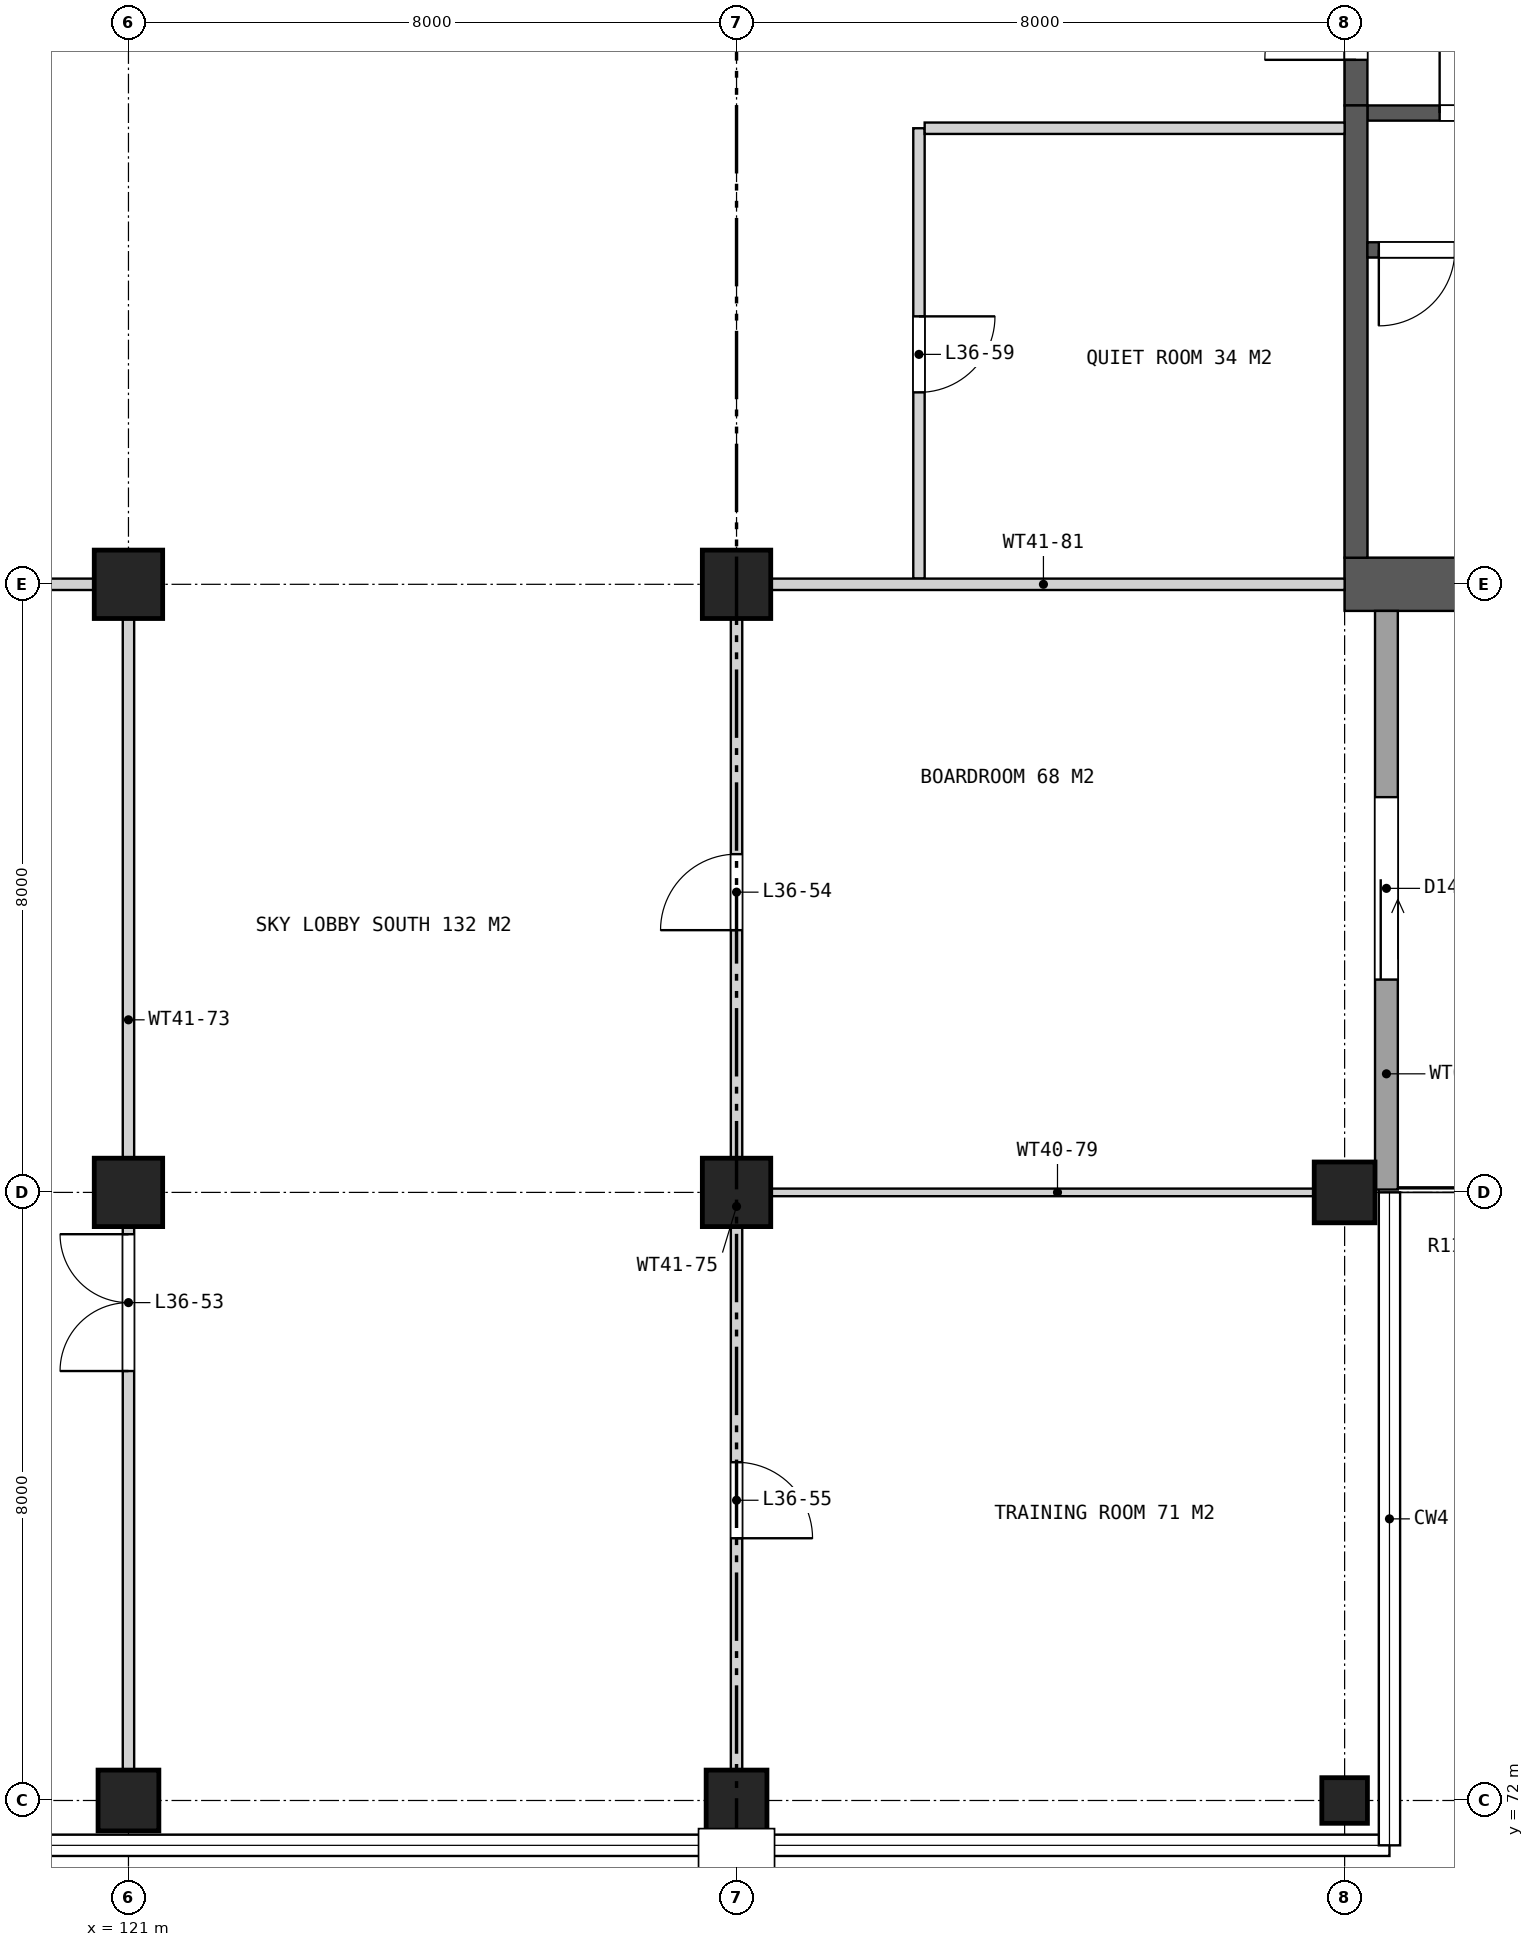
"""IFC4 building model, lengths in metres.
Left out: names, types, materials, properties, quantities, classifications, styles, units other than length and angle.
Written with IfcOpenShell. Run it as: python <this file> out.ifc"""

import sys

from ifc_helpers import new_model, si_unit, direction, frame, frame_2d, origin, origin_2d, place, context, subcontext, project, spatial, rectangle, extrude, element, fill, save


model = new_model("IFC4")
c1 = context("Model", 3, precision=1e-05, world=origin(), true_north=direction((0.0, 1.0)))
c2 = subcontext(c1, "Body", "Model", "MODEL_VIEW")
j1 = project(units=[si_unit("LENGTHUNIT", "METRE"), si_unit("PLANEANGLEUNIT", "RADIAN")], contexts=[c1])
p1 = place(None, origin())
s1 = spatial("IfcSite", under=j1, at=p1, CompositionType="ELEMENT")
p2 = place(p1, origin())
s2 = spatial("IfcBuilding", under=s1, at=p2, CompositionType="ELEMENT")
p3 = place(p2, frame((0.0, 0.0, 171.5)))
s3 = spatial("IfcBuildingStorey", under=s2, at=p3, CompositionType="ELEMENT", Elevation=171.5)
p4 = place(p3, frame((121.0, 72.0, 0.0), z_axis=(0.0, 0.0, 1.0), x_axis=(1.0, 0.0, 0.0)))
e1 = element("IfcColumn", 1, at=p4, inside=s3, PredefinedType="COLUMN", context=c2, shape_type="SweptSolid", body=[
    extrude(rectangle(XDim=0.8, YDim=0.8, at=origin_2d()), origin(), (0.0, 0.0, 1.0), 7.4),
])
for number, where, z_axis, x_axis in (
    (2, (121.0, 80.0, 0.0), (0.0, 0.0, 1.0), (1.0, 0.0, 0.0)),
    (3, (121.0, 88.0, 0.0), (0.0, 0.0, 1.0), (1.0, 0.0, 0.0)),
):
    element("IfcColumn", number, at=place(p3, frame(where, z_axis=z_axis, x_axis=x_axis)), inside=s3, PredefinedType="COLUMN", context=c2, shape_type="SweptSolid", body=[
        extrude(rectangle(XDim=0.9, YDim=0.9, at=origin_2d()), origin(), (0.0, 0.0, 1.0), 7.4),
    ])
p5 = place(p3, frame((129.0, 72.0, 0.0), z_axis=(0.0, 0.0, 1.0), x_axis=(1.0, 0.0, 0.0)))
e4 = element("IfcColumn", 4, at=p5, inside=s3, PredefinedType="COLUMN", context=c2, shape_type="SweptSolid", body=[
    extrude(rectangle(XDim=0.8, YDim=0.8, at=origin_2d()), origin(), (0.0, 0.0, 1.0), 7.4),
])
for number, where, z_axis, x_axis in (
    (5, (129.0, 80.0, 0.0), (0.0, 0.0, 1.0), (1.0, 0.0, 0.0)),
    (6, (129.0, 88.0, 0.0), (0.0, 0.0, 1.0), (1.0, 0.0, 0.0)),
):
    element("IfcColumn", number, at=place(p3, frame(where, z_axis=z_axis, x_axis=x_axis)), inside=s3, PredefinedType="COLUMN", context=c2, shape_type="SweptSolid", body=[
        extrude(rectangle(XDim=0.9, YDim=0.9, at=origin_2d()), origin(), (0.0, 0.0, 1.0), 7.4),
    ])
p6 = place(p3, frame((137.0, 72.0, 0.0), z_axis=(0.0, 0.0, 1.0), x_axis=(1.0, 0.0, 0.0)))
e7 = element("IfcColumn", 7, at=p6, inside=s3, PredefinedType="COLUMN", context=c2, shape_type="SweptSolid", body=[
    extrude(rectangle(XDim=0.6, YDim=0.6, at=origin_2d()), origin(), (0.0, 0.0, 1.0), 7.4),
])
p7 = place(p3, frame((137.0, 80.0, 0.0), z_axis=(0.0, 0.0, 1.0), x_axis=(1.0, 0.0, 0.0)))
e8 = element("IfcColumn", 8, at=p7, inside=s3, PredefinedType="COLUMN", context=c2, shape_type="SweptSolid", body=[
    extrude(rectangle(XDim=0.8, YDim=0.8, at=origin_2d()), origin(), (0.0, 0.0, 1.0), 7.4),
])
p8 = place(p3, frame((137.0, 88.0, 0.0), z_axis=(0.0, 0.0, 1.0), x_axis=(1.0, 0.0, 0.0)))
e9 = element("IfcWall", 9, at=p8, inside=s3, PredefinedType="SHEAR", context=c2, shape_type="SweptSolid", body=[
    extrude(rectangle(XDim=7.1, YDim=0.7, at=frame_2d((3.55, 0.0))), origin(), (0.0, 0.0, 1.0), 7.4),
])
p9 = place(p3, frame((137.15, 94.3, 0.0), z_axis=(0.0, 0.0, 1.0), x_axis=(0.0, 1.0, 0.0)))
e10 = element("IfcWall", 10, at=p9, inside=s3, PredefinedType="SHEAR", context=c2, shape_type="SweptSolid", body=[
    extrude(rectangle(XDim=11.4, YDim=0.3, at=frame_2d((5.7, 0.0))), origin(), (0.0, 0.0, 1.0), 7.4),
])
p10 = place(p9, frame((0.6, 0.0, 0.0)))
e11 = element("IfcOpeningElement", 11, at=p10, cuts=e10, PredefinedType="OPENING", context=c2, shape_type="SweptSolid", body=[
    extrude(rectangle(XDim=2.4, YDim=2.4, at=frame_2d((1.2, 1.2))), frame((0.0, 0.16, 0.0), z_axis=(0.0, -1.0, 0.0), x_axis=(1.0, 0.0, 0.0)), (0.0, 0.0, 1.0), 0.32),
])
p11 = place(p9, frame((4.5, 0.0, 0.0)))
e12 = element("IfcOpeningElement", 12, at=p11, cuts=e10, PredefinedType="OPENING", context=c2, shape_type="SweptSolid", body=[
    extrude(rectangle(XDim=2.4, YDim=2.4, at=frame_2d((1.2, 1.2))), frame((0.0, 0.16, 0.0), z_axis=(0.0, -1.0, 0.0), x_axis=(1.0, 0.0, 0.0)), (0.0, 0.0, 1.0), 0.32),
])
p12 = place(p9, frame((8.4, 0.0, 0.0)))
e13 = element("IfcOpeningElement", 13, at=p12, cuts=e10, PredefinedType="OPENING", context=c2, shape_type="SweptSolid", body=[
    extrude(rectangle(XDim=2.4, YDim=2.4, at=frame_2d((1.2, 1.2))), frame((0.0, 0.16, 0.0), z_axis=(0.0, -1.0, 0.0), x_axis=(1.0, 0.0, 0.0)), (0.0, 0.0, 1.0), 0.32),
])
p13 = place(p3, frame((137.3, 94.2, 0.0), z_axis=(0.0, 0.0, 1.0), x_axis=(1.0, 0.0, 0.0)))
e14 = element("IfcWall", 14, at=p13, inside=s3, PredefinedType="SHEAR", context=c2, shape_type="SweptSolid", body=[
    extrude(rectangle(XDim=15.35, YDim=0.2, at=frame_2d((7.675, 0.0))), origin(), (0.0, 0.0, 1.0), 7.4),
])
p14 = place(p13, frame((0.95, 0.0, 0.0)))
e15 = element("IfcOpeningElement", 15, at=p14, cuts=e14, PredefinedType="OPENING", context=c2, shape_type="SweptSolid", body=[
    extrude(rectangle(XDim=1.1, YDim=2.1, at=frame_2d((0.55, 1.05))), frame((0.0, 0.11, 0.0), z_axis=(0.0, -1.0, 0.0), x_axis=(1.0, 0.0, 0.0)), (0.0, 0.0, 1.0), 0.22),
])
p15 = place(p3, frame((137.15, 88.35, 0.0), z_axis=(0.0, 0.0, 1.0), x_axis=(0.0, 1.0, 0.0)))
e16 = element("IfcWall", 16, at=p15, inside=s3, PredefinedType="SHEAR", context=c2, shape_type="SweptSolid", body=[
    extrude(rectangle(XDim=5.95, YDim=0.3, at=frame_2d((2.975, 0.0))), origin(), (0.0, 0.0, 1.0), 7.4),
])
p16 = place(p3, frame((137.3, 92.4, 0.0), z_axis=(0.0, 0.0, 1.0), x_axis=(1.0, 0.0, 0.0)))
e17 = element("IfcWall", 17, at=p16, inside=s3, PredefinedType="SHEAR", context=c2, shape_type="SweptSolid", body=[
    extrude(rectangle(XDim=6.8, YDim=0.2, at=frame_2d((3.4, 0.0))), origin(), (0.0, 0.0, 1.0), 7.4),
])
p17 = place(p16, frame((0.15, 0.0, 0.0)))
e18 = element("IfcOpeningElement", 18, at=p17, cuts=e17, PredefinedType="OPENING", context=c2, shape_type="SweptSolid", body=[
    extrude(rectangle(XDim=1.0, YDim=2.1, at=frame_2d((0.5, 1.05))), frame((0.0, 0.11, 0.0), z_axis=(0.0, -1.0, 0.0), x_axis=(1.0, 0.0, 0.0)), (0.0, 0.0, 1.0), 0.22),
])
p18 = place(p3, frame((137.55, 80.038, 0.0), z_axis=(0.0, 0.0, 1.0), x_axis=(0.0, 1.0, 0.0)))
e19 = element("IfcWall", 19, at=p18, inside=s3, PredefinedType="SOLIDWALL", context=c2, shape_type="SweptSolid", body=[
    extrude(rectangle(XDim=7.612, YDim=0.3, at=frame_2d((3.806, 0.0))), origin(), (0.0, 0.0, 1.0), 7.1),
])
p19 = place(p18, frame((2.762, 0.0, 0.0)))
e20 = element("IfcOpeningElement", 20, at=p19, cuts=e19, PredefinedType="OPENING", context=c2, shape_type="SweptSolid", body=[
    extrude(rectangle(XDim=2.4, YDim=2.4, at=frame_2d((1.2, 1.2))), frame((0.0, 0.16, 0.0), z_axis=(0.0, -1.0, 0.0), x_axis=(1.0, 0.0, 0.0)), (0.0, 0.0, 1.0), 0.32),
])
p20 = place(p3, frame((121.0, 71.63, 0.0), z_axis=(0.0, 0.0, 1.0), x_axis=(0.0, 1.0, 0.0)))
e21 = element("IfcWall", 21, at=p20, inside=s3, PredefinedType="PARTITIONING", context=c2, shape_type="SweptSolid", body=[
    extrude(rectangle(XDim=16.37, YDim=0.15, at=frame_2d((8.185, 0.0))), origin(), (0.0, 0.0, 1.0), 6.64),
])
p21 = place(p20, frame((6.02, 0.0, 0.0)))
e22 = element("IfcOpeningElement", 22, at=p21, cuts=e21, PredefinedType="OPENING", context=c2, shape_type="SweptSolid", body=[
    extrude(rectangle(XDim=1.8, YDim=2.1, at=frame_2d((0.9, 1.05))), frame((0.0, 0.085, 0.0), z_axis=(0.0, -1.0, 0.0), x_axis=(1.0, 0.0, 0.0)), (0.0, 0.0, 1.0), 0.17),
])
p22 = place(p3, frame((129.0, 71.63, 0.0), z_axis=(0.0, 0.0, 1.0), x_axis=(0.0, 1.0, 0.0)))
e23 = element("IfcWall", 23, at=p22, inside=s3, PredefinedType="PARTITIONING", context=c2, shape_type="SweptSolid", body=[
    extrude(rectangle(XDim=16.37, YDim=0.15, at=frame_2d((8.185, 0.0))), origin(), (0.0, 0.0, 1.0), 6.64),
])
p23 = place(p22, frame((11.82, 0.0, 0.0)))
e24 = element("IfcOpeningElement", 24, at=p23, cuts=e23, PredefinedType="OPENING", context=c2, shape_type="SweptSolid", body=[
    extrude(rectangle(XDim=1.0, YDim=2.1, at=frame_2d((0.5, 1.05))), frame((0.0, 0.085, 0.0), z_axis=(0.0, -1.0, 0.0), x_axis=(1.0, 0.0, 0.0)), (0.0, 0.0, 1.0), 0.17),
])
p24 = place(p22, frame((3.82, 0.0, 0.0)))
e25 = element("IfcOpeningElement", 25, at=p24, cuts=e23, PredefinedType="OPENING", context=c2, shape_type="SweptSolid", body=[
    extrude(rectangle(XDim=1.0, YDim=2.1, at=frame_2d((0.5, 1.05))), frame((0.0, 0.085, 0.0), z_axis=(0.0, -1.0, 0.0), x_axis=(1.0, 0.0, 0.0)), (0.0, 0.0, 1.0), 0.17),
])
p25 = place(p3, frame((131.4, 88.075, 0.0), z_axis=(0.0, 0.0, 1.0), x_axis=(0.0, 1.0, 0.0)))
e26 = element("IfcWall", 26, at=p25, inside=s3, PredefinedType="PARTITIONING", context=c2, shape_type="SweptSolid", body=[
    extrude(rectangle(XDim=5.925, YDim=0.15, at=frame_2d((2.962, 0.0))), origin(), (0.0, 0.0, 1.0), 6.64),
])
p26 = place(p25, frame((2.45, 0.0, 0.0)))
e27 = element("IfcOpeningElement", 27, at=p26, cuts=e26, PredefinedType="OPENING", context=c2, shape_type="SweptSolid", body=[
    extrude(rectangle(XDim=1.0, YDim=2.1, at=frame_2d((0.5, 1.05))), frame((0.0, 0.085, 0.0), z_axis=(0.0, -1.0, 0.0), x_axis=(1.0, 0.0, 0.0)), (0.0, 0.0, 1.0), 0.17),
])
p27 = place(p3, frame((129.075, 80.0, 0.0), z_axis=(0.0, 0.0, 1.0), x_axis=(1.0, 0.0, 0.0)))
e28 = element("IfcWall", 28, at=p27, inside=s3, PredefinedType="PARTITIONING", context=c2, shape_type="SweptSolid", body=[
    extrude(rectangle(XDim=8.295, YDim=0.1, at=frame_2d((4.147, 0.0))), origin(), (0.0, 0.0, 1.0), 6.64),
])
for number, where, z_axis, x_axis in (
    (29, (113.0, 88.0, 0.0), (0.0, 0.0, 1.0), (1.0, 0.0, 0.0)),
    (30, (129.075, 88.0, 0.0), (0.0, 0.0, 1.0), (1.0, 0.0, 0.0)),
):
    element("IfcWall", number, at=place(p3, frame(where, z_axis=z_axis, x_axis=x_axis)), inside=s3, PredefinedType="PARTITIONING", context=c2, shape_type="SweptSolid", body=[
        extrude(rectangle(XDim=7.925, YDim=0.15, at=frame_2d((3.962, 0.0))), origin(), (0.0, 0.0, 1.0), 6.64),
    ])
p28 = place(p3, frame((131.475, 94.0, 0.0), z_axis=(0.0, 0.0, 1.0), x_axis=(1.0, 0.0, 0.0)))
e31 = element("IfcWall", 31, at=p28, inside=s3, PredefinedType="PARTITIONING", context=c2, shape_type="SweptSolid", body=[
    extrude(rectangle(XDim=5.525, YDim=0.15, at=frame_2d((2.762, 0.0))), origin(), (0.0, 0.0, 1.0), 6.64),
])
p29 = place(p10, origin())
e32 = element("IfcDoor", 32, at=p29, inside=s3, OperationType="DOUBLE_DOOR_SINGLE_SWING", PredefinedType="DOOR", context=c2, shape_type="SweptSolid", body=[
    extrude(rectangle(XDim=2.4, YDim=2.4, at=frame_2d((1.2, 1.2))), frame((0.0, 0.025, 0.0), z_axis=(0.0, -1.0, 0.0), x_axis=(1.0, 0.0, 0.0)), (0.0, 0.0, 1.0), 0.05),
])
fill(e11, e32)
p30 = place(p14, origin())
e33 = element("IfcDoor", 33, at=p30, inside=s3, OperationType="SINGLE_SWING_LEFT", PredefinedType="DOOR", context=c2, shape_type="SweptSolid", body=[
    extrude(rectangle(XDim=1.1, YDim=2.1, at=frame_2d((0.55, 1.05))), frame((0.0, 0.025, 0.0), z_axis=(0.0, -1.0, 0.0), x_axis=(1.0, 0.0, 0.0)), (0.0, 0.0, 1.0), 0.05),
])
fill(e15, e33)
p31 = place(p17, frame((1.0, 0.0, 0.0), z_axis=(0.0, 0.0, 1.0), x_axis=(-1.0, 0.0, 0.0)))
e34 = element("IfcDoor", 34, at=p31, inside=s3, OperationType="SINGLE_SWING_RIGHT", PredefinedType="DOOR", context=c2, shape_type="SweptSolid", body=[
    extrude(rectangle(XDim=1.0, YDim=2.1, at=frame_2d((0.5, 1.05))), frame((0.0, 0.025, 0.0), z_axis=(0.0, -1.0, 0.0), x_axis=(1.0, 0.0, 0.0)), (0.0, 0.0, 1.0), 0.05),
])
fill(e18, e34)
p32 = place(p19, frame((2.4, 0.0, 0.0), z_axis=(0.0, 0.0, 1.0), x_axis=(-1.0, 0.0, 0.0)))
e35 = element("IfcDoor", 35, at=p32, inside=s3, OperationType="SLIDING_TO_LEFT", PredefinedType="DOOR", context=c2, shape_type="SweptSolid", body=[
    extrude(rectangle(XDim=2.4, YDim=2.4, at=frame_2d((1.2, 1.2))), frame((0.0, 0.025, 0.0), z_axis=(0.0, -1.0, 0.0), x_axis=(1.0, 0.0, 0.0)), (0.0, 0.0, 1.0), 0.05),
])
fill(e20, e35)
p33 = place(p21, origin())
e36 = element("IfcDoor", 36, at=p33, inside=s3, OperationType="DOUBLE_DOOR_SINGLE_SWING", PredefinedType="DOOR", context=c2, shape_type="SweptSolid", body=[
    extrude(rectangle(XDim=1.8, YDim=2.1, at=frame_2d((0.9, 1.05))), frame((0.0, 0.025, 0.0), z_axis=(0.0, -1.0, 0.0), x_axis=(1.0, 0.0, 0.0)), (0.0, 0.0, 1.0), 0.05),
])
fill(e22, e36)
p34 = place(p23, origin())
e37 = element("IfcDoor", 37, at=p34, inside=s3, OperationType="SINGLE_SWING_LEFT", PredefinedType="DOOR", context=c2, shape_type="SweptSolid", body=[
    extrude(rectangle(XDim=1.0, YDim=2.1, at=frame_2d((0.5, 1.05))), frame((0.0, 0.025, 0.0), z_axis=(0.0, -1.0, 0.0), x_axis=(1.0, 0.0, 0.0)), (0.0, 0.0, 1.0), 0.05),
])
fill(e24, e37)
p35 = place(p24, frame((1.0, 0.0, 0.0), z_axis=(0.0, 0.0, 1.0), x_axis=(-1.0, 0.0, 0.0)))
e38 = element("IfcDoor", 38, at=p35, inside=s3, OperationType="SINGLE_SWING_RIGHT", PredefinedType="DOOR", context=c2, shape_type="SweptSolid", body=[
    extrude(rectangle(XDim=1.0, YDim=2.1, at=frame_2d((0.5, 1.05))), frame((0.0, 0.025, 0.0), z_axis=(0.0, -1.0, 0.0), x_axis=(1.0, 0.0, 0.0)), (0.0, 0.0, 1.0), 0.05),
])
fill(e25, e38)
p36 = place(p26, frame((1.0, 0.0, 0.0), z_axis=(0.0, 0.0, 1.0), x_axis=(-1.0, 0.0, 0.0)))
e39 = element("IfcDoor", 39, at=p36, inside=s3, OperationType="SINGLE_SWING_LEFT", PredefinedType="DOOR", context=c2, shape_type="SweptSolid", body=[
    extrude(rectangle(XDim=1.0, YDim=2.1, at=frame_2d((0.5, 1.05))), frame((0.0, 0.025, 0.0), z_axis=(0.0, -1.0, 0.0), x_axis=(1.0, 0.0, 0.0)), (0.0, 0.0, 1.0), 0.05),
])
fill(e27, e39)
save(model, sys.argv[1])
